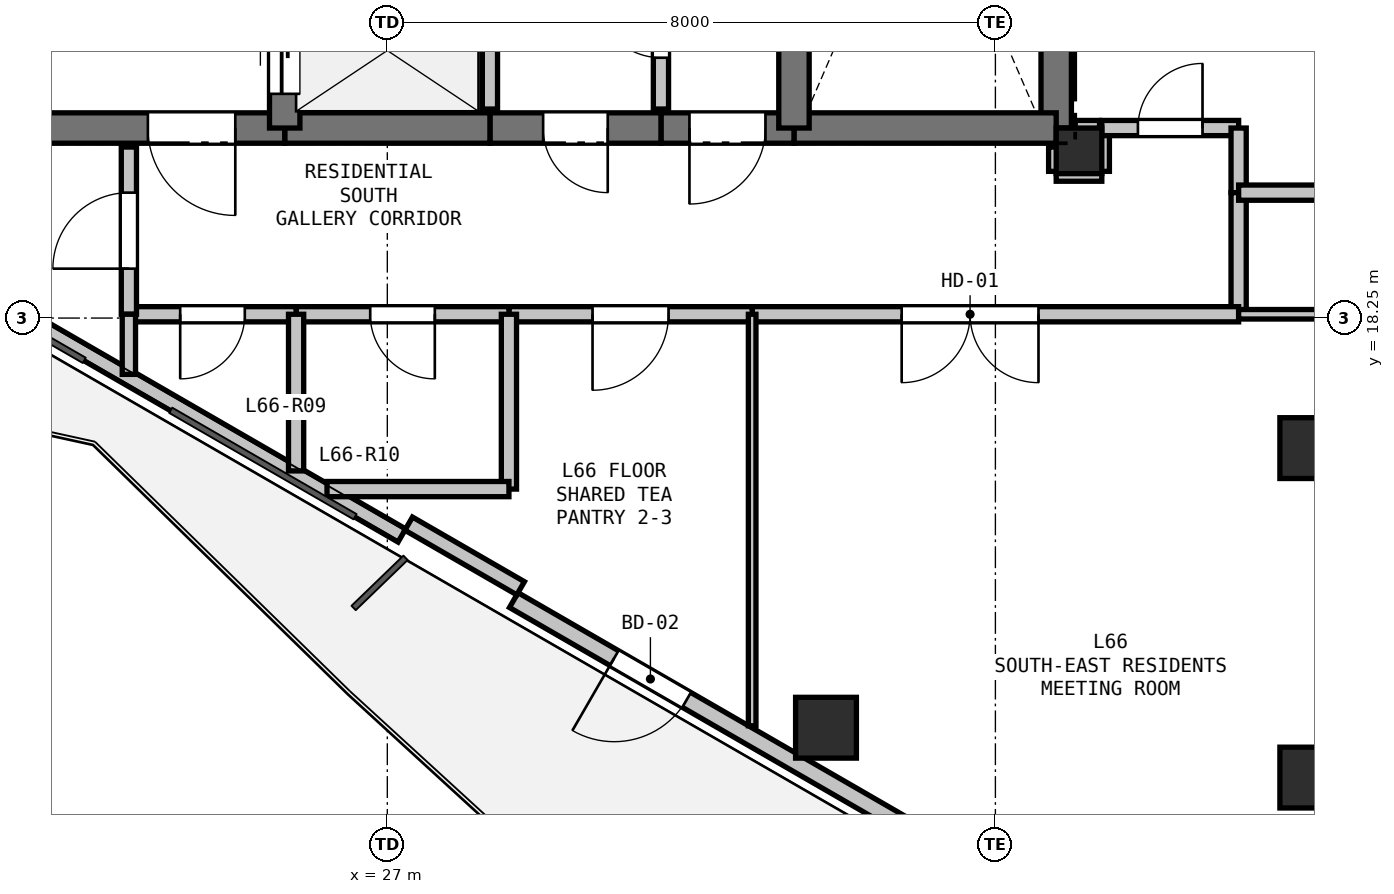
"""IFC4 building model, lengths in metres.
Left out: names, types, materials, properties, quantities, classifications, styles, units other than length and angle.
Written with IfcOpenShell. Run it as: python <this file> out.ifc"""

import sys

from ifc_helpers import new_model, si_unit, direction, frame, frame_2d, origin, origin_2d, place, context, subcontext, project, spatial, rectangle, hollow_rectangle, extrude, element, fill, save


model = new_model("IFC4")
c1 = context("Model", 3, precision=1e-05, world=origin(), true_north=direction((0.0, 1.0)))
c2 = subcontext(c1, "Body", "Model", "MODEL_VIEW")
j1 = project(units=[si_unit("LENGTHUNIT", "METRE"), si_unit("PLANEANGLEUNIT", "RADIAN")], contexts=[c1])
p1 = place(None, origin())
s1 = spatial("IfcSite", under=j1, at=p1, CompositionType="ELEMENT")
p2 = place(p1, origin())
s2 = spatial("IfcBuilding", under=s1, at=p2, CompositionType="ELEMENT")
p3 = place(p2, frame((0.0, 0.0, 236.4)))
s3 = spatial("IfcBuildingStorey", under=s2, at=p3, CompositionType="ELEMENT", Elevation=236.4)
p4 = place(p3, frame((36.1, 20.45, 0.0), z_axis=(0.0, 0.0, 1.0), x_axis=(1.0, 0.0, 0.0)))
e1 = element("IfcColumn", 1, at=p4, inside=s3, PredefinedType="COLUMN", context=c2, shape_type="SweptSolid", body=[
    extrude(rectangle(XDim=0.6, YDim=0.6, at=origin_2d()), origin(), (0.0, 0.0, 1.0), 3.3),
])
for number, where, z_axis, x_axis in (
    (2, (39.143, 16.539, 0.0), (0.0, 0.0, 1.0), (1.0, 0.0, 0.0)),
    (3, (39.143, 12.205, 0.0), (0.0, 0.0, 1.0), (1.0, 0.0, 0.0)),
    (4, (32.771, 12.861, 0.0), (0.0, 0.0, 1.0), (1.0, 0.0, 0.0)),
):
    element("IfcColumn", number, at=place(p3, frame(where, z_axis=z_axis, x_axis=x_axis)), inside=s3, PredefinedType="COLUMN", context=c2, shape_type="SweptSolid", body=[
        extrude(hollow_rectangle(XDim=0.8, YDim=0.8, WallThickness=0.025, at=origin_2d()), origin(), (0.0, 0.0, 1.0), 3.3),
    ])
p5 = place(p3, frame((39.743, 11.858, 0.0), z_axis=(0.0, 0.0, 1.0), x_axis=(-0.866038962515, -0.499976514854, 0.0)))
e5 = element("IfcWall", 5, at=p5, inside=s3, PredefinedType="SOLIDWALL", context=c2, shape_type="SweptSolid", body=[
    extrude(rectangle(XDim=3.716, YDim=0.225, at=frame_2d((1.858, 0.0))), origin(), (0.0, 0.0, 1.0), 2.7),
])
p6 = place(p3, frame((36.395, 10.076, 0.0), z_axis=(0.0, 0.0, 1.0), x_axis=(-0.866026655105, 0.499997832642, 0.0)))
e6 = element("IfcWall", 6, at=p6, inside=s3, PredefinedType="SOLIDWALL", context=c2, shape_type="SweptSolid", body=[
    extrude(rectangle(XDim=8.928, YDim=0.225, at=frame_2d((4.464, 0.0))), origin(), (0.0, 0.0, 1.0), 2.7),
])
p7 = place(p6, frame((6.302, 0.0, 0.0)))
e7 = element("IfcOpeningElement", 7, at=p7, cuts=e6, PredefinedType="OPENING", context=c2, shape_type="SweptSolid", body=[
    extrude(rectangle(XDim=1.1, YDim=2.1, at=frame_2d((0.55, 1.05))), frame((0.0, 0.123, 0.0), z_axis=(0.0, -1.0, 0.0), x_axis=(1.0, 0.0, 0.0)), (0.0, 0.0, 1.0), 0.245),
])
p8 = place(p3, frame((27.191, 15.389, 0.0), z_axis=(0.0, 0.0, 1.0), x_axis=(-0.866019557082, 0.500010126649, 0.0)))
e8 = element("IfcWall", 8, at=p8, inside=s3, PredefinedType="PARAPET", context=c2, shape_type="SweptSolid", body=[
    extrude(rectangle(XDim=8.228, YDim=0.2, at=frame_2d((4.114, 0.0))), origin(), (0.0, 0.0, 1.0), 0.2),
])
p9 = place(p3, frame((28.754, 14.695, 0.0), z_axis=(0.0, 0.0, 1.0), x_axis=(-0.866025371046, 0.500000056704, 0.0)))
e9 = element("IfcWall", 9, at=p9, inside=s3, PredefinedType="PARAPET", context=c2, shape_type="SweptSolid", body=[
    extrude(rectangle(XDim=1.7, YDim=0.2, at=frame_2d((0.85, 0.0))), origin(), (0.0, 0.0, 1.0), 2.7),
])
p10 = place(p3, frame((35.8, 28.1, 0.0), z_axis=(0.0, 0.0, 1.0), x_axis=(0.0, -1.0, 0.0)))
e10 = element("IfcWall", 10, at=p10, inside=s3, PredefinedType="SHEAR", context=c2, shape_type="SweptSolid", body=[
    extrude(rectangle(XDim=7.35, YDim=0.4, at=frame_2d((3.675, 0.0))), origin(), (0.0, 0.0, 1.0), 3.08),
])
p11 = place(p3, frame((35.8, 20.75, 0.0), z_axis=(0.0, 0.0, 1.0), x_axis=(-1.0, 0.0, 0.0)))
e11 = element("IfcWall", 11, at=p11, inside=s3, PredefinedType="SHEAR", context=c2, shape_type="SweptSolid", body=[
    extrude(rectangle(XDim=3.45, YDim=0.4, at=frame_2d((1.725, 0.0))), origin(), (0.0, 0.0, 1.0), 3.08),
])
p12 = place(p3, frame((32.35, 20.75, 0.0), z_axis=(0.0, 0.0, 1.0), x_axis=(-1.0, 0.0, 0.0)))
e12 = element("IfcWall", 12, at=p12, inside=s3, PredefinedType="SHEAR", context=c2, shape_type="SweptSolid", body=[
    extrude(rectangle(XDim=1.75, YDim=0.4, at=frame_2d((0.875, 0.0))), origin(), (0.0, 0.0, 1.0), 3.08),
])
p13 = place(p12, frame((0.375, 0.0, 0.0)))
e13 = element("IfcOpeningElement", 13, at=p13, cuts=e12, PredefinedType="OPENING", context=c2, shape_type="SweptSolid", body=[
    extrude(rectangle(XDim=1.0, YDim=2.15, at=frame_2d((0.5, 1.075))), frame((0.0, 0.21, 0.0), z_axis=(0.0, -1.0, 0.0), x_axis=(1.0, 0.0, 0.0)), (0.0, 0.0, 1.0), 0.42),
])
p14 = place(p3, frame((30.6, 20.75, 0.0), z_axis=(0.0, 0.0, 1.0), x_axis=(-1.0, 0.0, 0.0)))
e14 = element("IfcWall", 14, at=p14, inside=s3, PredefinedType="SHEAR", context=c2, shape_type="SweptSolid", body=[
    extrude(rectangle(XDim=2.25, YDim=0.4, at=frame_2d((1.125, 0.0))), origin(), (0.0, 0.0, 1.0), 3.08),
])
p15 = place(p14, frame((0.7, 0.0, 0.0)))
e15 = element("IfcOpeningElement", 15, at=p15, cuts=e14, PredefinedType="OPENING", context=c2, shape_type="SweptSolid", body=[
    extrude(rectangle(XDim=0.85, YDim=2.1, at=frame_2d((0.425, 1.05))), frame((0.0, 0.21, 0.0), z_axis=(0.0, -1.0, 0.0), x_axis=(1.0, 0.0, 0.0)), (0.0, 0.0, 1.0), 0.42),
])
p16 = place(p3, frame((28.35, 20.75, 0.0), z_axis=(0.0, 0.0, 1.0), x_axis=(-1.0, 0.0, 0.0)))
e16 = element("IfcWall", 16, at=p16, inside=s3, PredefinedType="SHEAR", context=c2, shape_type="SweptSolid", body=[
    extrude(rectangle(XDim=2.7, YDim=0.4, at=frame_2d((1.35, 0.0))), origin(), (0.0, 0.0, 1.0), 3.08),
])
p17 = place(p3, frame((25.65, 20.75, 0.0), z_axis=(0.0, 0.0, 1.0), x_axis=(-1.0, 0.0, 0.0)))
e17 = element("IfcWall", 17, at=p17, inside=s3, PredefinedType="SHEAR", context=c2, shape_type="SweptSolid", body=[
    extrude(rectangle(XDim=3.45, YDim=0.4, at=frame_2d((1.725, 0.0))), origin(), (0.0, 0.0, 1.0), 3.08),
])
p18 = place(p17, frame((0.65, 0.0, 0.0)))
e18 = element("IfcOpeningElement", 18, at=p18, cuts=e17, PredefinedType="OPENING", context=c2, shape_type="SweptSolid", body=[
    extrude(rectangle(XDim=1.15, YDim=2.15, at=frame_2d((0.575, 1.075))), frame((0.0, 0.21, 0.0), z_axis=(0.0, -1.0, 0.0), x_axis=(1.0, 0.0, 0.0)), (0.0, 0.0, 1.0), 0.42),
])
p19 = place(p3, frame((25.65, 20.75, 0.0), z_axis=(0.0, 0.0, 1.0), x_axis=(0.0, 1.0, 0.0)))
e19 = element("IfcWall", 19, at=p19, inside=s3, PredefinedType="SHEAR", context=c2, shape_type="SweptSolid", body=[
    extrude(rectangle(XDim=2.0, YDim=0.4, at=frame_2d((1.0, 0.0))), origin(), (0.0, 0.0, 1.0), 3.08),
])
p20 = place(p19, frame((0.45, 0.0, 0.0)))
e20 = element("IfcOpeningElement", 20, at=p20, cuts=e19, PredefinedType="OPENING", context=c2, shape_type="SweptSolid", body=[
    extrude(rectangle(XDim=1.1, YDim=2.15, at=frame_2d((0.55, 1.075))), frame((0.0, 0.21, 0.0), z_axis=(0.0, -1.0, 0.0), x_axis=(1.0, 0.0, 0.0)), (0.0, 0.0, 1.0), 0.42),
])
p21 = place(p3, frame((32.35, 20.75, 0.0), z_axis=(0.0, 0.0, 1.0), x_axis=(0.0, 1.0, 0.0)))
e21 = element("IfcWall", 21, at=p21, inside=s3, PredefinedType="SHEAR", context=c2, shape_type="SweptSolid", body=[
    extrude(rectangle(XDim=4.8, YDim=0.4, at=frame_2d((2.4, 0.0))), origin(), (0.0, 0.0, 1.0), 3.08),
])
p22 = place(p3, frame((28.35, 23.2, 0.0), z_axis=(0.0, 0.0, 1.0), x_axis=(0.0, -1.0, 0.0)))
e22 = element("IfcWall", 22, at=p22, inside=s3, PredefinedType="PARTITIONING", context=c2, shape_type="SweptSolid", body=[
    extrude(rectangle(XDim=2.2, YDim=0.2, at=frame_2d((1.1, 0.0))), origin(), (0.0, 0.0, 1.0), 3.08),
])
p23 = place(p3, frame((30.6, 21.0, 0.0), z_axis=(0.0, 0.0, 1.0), x_axis=(0.0, 1.0, 0.0)))
e23 = element("IfcWall", 23, at=p23, inside=s3, PredefinedType="PARTITIONING", context=c2, shape_type="SweptSolid", body=[
    extrude(rectangle(XDim=2.2, YDim=0.2, at=frame_2d((1.1, 0.0))), origin(), (0.0, 0.0, 1.0), 3.08),
])
p24 = place(p23, frame((0.675, 0.0, 0.0)))
e24 = element("IfcOpeningElement", 24, at=p24, cuts=e23, PredefinedType="OPENING", context=c2, shape_type="SweptSolid", body=[
    extrude(rectangle(XDim=0.85, YDim=2.1, at=frame_2d((0.425, 1.05))), frame((0.0, 0.11, 0.0), z_axis=(0.0, -1.0, 0.0), x_axis=(1.0, 0.0, 0.0)), (0.0, 0.0, 1.0), 0.22),
])
p25 = place(p3, frame((35.8, 20.15, 0.0), z_axis=(0.0, 0.0, 1.0), x_axis=(1.0, 0.0, 0.0)))
e25 = element("IfcWall", 25, at=p25, inside=s3, PredefinedType="PARTITIONING", context=c2, shape_type="SweptSolid", body=[
    extrude(rectangle(XDim=0.6, YDim=0.2, at=frame_2d((0.3, 0.0))), origin(), (0.0, 0.0, 1.0), 2.528),
])
p26 = place(p3, frame((36.4, 20.18, 0.0), z_axis=(0.0, 0.0, 1.0), x_axis=(0.0, 1.0, 0.0)))
e26 = element("IfcWall", 26, at=p26, inside=s3, PredefinedType="PARTITIONING", context=c2, shape_type="SweptSolid", body=[
    extrude(rectangle(XDim=0.57, YDim=0.2, at=frame_2d((0.285, 0.0))), origin(), (0.0, 0.0, 1.0), 3.08),
])
p27 = place(p3, frame((36.4, 20.75, 0.0), z_axis=(0.0, 0.0, 1.0), x_axis=(1.0, 0.0, 0.0)))
e27 = element("IfcWall", 27, at=p27, inside=s3, PredefinedType="PARTITIONING", context=c2, shape_type="SweptSolid", body=[
    extrude(rectangle(XDim=1.8, YDim=0.2, at=frame_2d((0.9, 0.0))), origin(), (0.0, 0.0, 1.0), 3.08),
])
p28 = place(p27, frame((0.475, 0.0, 0.0)))
e28 = element("IfcOpeningElement", 28, at=p28, cuts=e27, PredefinedType="OPENING", context=c2, shape_type="SweptSolid", body=[
    extrude(rectangle(XDim=0.85, YDim=2.1, at=frame_2d((0.425, 1.05))), frame((0.0, 0.11, 0.0), z_axis=(0.0, -1.0, 0.0), x_axis=(1.0, 0.0, 0.0)), (0.0, 0.0, 1.0), 0.22),
])
p29 = place(p3, frame((38.2, 20.75, 0.0), z_axis=(0.0, 0.0, 1.0), x_axis=(0.0, -1.0, 0.0)))
e29 = element("IfcWall", 29, at=p29, inside=s3, PredefinedType="PARTITIONING", context=c2, shape_type="SweptSolid", body=[
    extrude(rectangle(XDim=0.85, YDim=0.2, at=frame_2d((0.425, 0.0))), origin(), (0.0, 0.0, 1.0), 3.08),
])
p30 = place(p3, frame((38.2, 19.9, 0.0), z_axis=(0.0, 0.0, 1.0), x_axis=(0.0, -1.0, 0.0)))
e30 = element("IfcWall", 30, at=p30, inside=s3, PredefinedType="PARTITIONING", context=c2, shape_type="SweptSolid", body=[
    extrude(rectangle(XDim=1.6, YDim=0.2, at=frame_2d((0.8, 0.0))), origin(), (0.0, 0.0, 1.0), 3.08),
])
p31 = place(p3, frame((38.2, 18.3, 0.0), z_axis=(0.0, 0.0, 1.0), x_axis=(-1.0, 0.0, 0.0)))
e31 = element("IfcWall", 31, at=p31, inside=s3, PredefinedType="PARTITIONING", context=c2, shape_type="SweptSolid", body=[
    extrude(rectangle(XDim=6.4, YDim=0.2, at=frame_2d((3.2, 0.0))), origin(), (0.0, 0.0, 1.0), 2.528),
])
p32 = place(p31, frame((2.633, 0.0, 0.0)))
e32 = element("IfcOpeningElement", 32, at=p32, cuts=e31, PredefinedType="OPENING", context=c2, shape_type="SweptSolid", body=[
    extrude(rectangle(XDim=1.8, YDim=2.2, at=frame_2d((0.9, 1.1))), frame((0.0, 0.11, 0.0), z_axis=(0.0, -1.0, 0.0), x_axis=(1.0, 0.0, 0.0)), (0.0, 0.0, 1.0), 0.22),
])
p33 = place(p3, frame((31.8, 18.3, 0.0), z_axis=(0.0, 0.0, 1.0), x_axis=(-1.0, 0.0, 0.0)))
e33 = element("IfcWall", 33, at=p33, inside=s3, PredefinedType="PARTITIONING", context=c2, shape_type="SweptSolid", body=[
    extrude(rectangle(XDim=3.2, YDim=0.2, at=frame_2d((1.6, 0.0))), origin(), (0.0, 0.0, 1.0), 3.08),
])
p34 = place(p33, frame((1.1, 0.0, 0.0)))
e34 = element("IfcOpeningElement", 34, at=p34, cuts=e33, PredefinedType="OPENING", context=c2, shape_type="SweptSolid", body=[
    extrude(rectangle(XDim=1.0, YDim=2.15, at=frame_2d((0.5, 1.075))), frame((0.0, 0.11, 0.0), z_axis=(0.0, -1.0, 0.0), x_axis=(1.0, 0.0, 0.0)), (0.0, 0.0, 1.0), 0.22),
])
p35 = place(p3, frame((28.6, 18.3, 0.0), z_axis=(0.0, 0.0, 1.0), x_axis=(-1.0, 0.0, 0.0)))
e35 = element("IfcWall", 35, at=p35, inside=s3, PredefinedType="PARTITIONING", context=c2, shape_type="SweptSolid", body=[
    extrude(rectangle(XDim=2.8, YDim=0.2, at=frame_2d((1.4, 0.0))), origin(), (0.0, 0.0, 1.0), 3.08),
])
p36 = place(p35, frame((0.975, 0.0, 0.0)))
e36 = element("IfcOpeningElement", 36, at=p36, cuts=e35, PredefinedType="OPENING", context=c2, shape_type="SweptSolid", body=[
    extrude(rectangle(XDim=0.85, YDim=2.1, at=frame_2d((0.425, 1.05))), frame((0.0, 0.11, 0.0), z_axis=(0.0, -1.0, 0.0), x_axis=(1.0, 0.0, 0.0)), (0.0, 0.0, 1.0), 0.22),
])
p37 = place(p3, frame((25.8, 18.3, 0.0), z_axis=(0.0, 0.0, 1.0), x_axis=(-1.0, 0.0, 0.0)))
e37 = element("IfcWall", 37, at=p37, inside=s3, PredefinedType="PARTITIONING", context=c2, shape_type="SweptSolid", body=[
    extrude(rectangle(XDim=2.2, YDim=0.2, at=frame_2d((1.1, 0.0))), origin(), (0.0, 0.0, 1.0), 2.365),
])
p38 = place(p37, frame((0.675, 0.0, 0.0)))
e38 = element("IfcOpeningElement", 38, at=p38, cuts=e37, PredefinedType="OPENING", context=c2, shape_type="SweptSolid", body=[
    extrude(rectangle(XDim=0.85, YDim=2.1, at=frame_2d((0.425, 1.05))), frame((0.0, 0.11, 0.0), z_axis=(0.0, -1.0, 0.0), x_axis=(1.0, 0.0, 0.0)), (0.0, 0.0, 1.0), 0.22),
])
p39 = place(p3, frame((23.6, 18.3, 0.0), z_axis=(0.0, 0.0, 1.0), x_axis=(0.0, 1.0, 0.0)))
e39 = element("IfcWall", 39, at=p39, inside=s3, PredefinedType="PARTITIONING", context=c2, shape_type="SweptSolid", body=[
    extrude(rectangle(XDim=2.2, YDim=0.2, at=frame_2d((1.1, 0.0))), origin(), (0.0, 0.0, 1.0), 2.528),
])
p40 = place(p39, frame((0.6, 0.0, 0.0)))
e40 = element("IfcOpeningElement", 40, at=p40, cuts=e39, PredefinedType="OPENING", context=c2, shape_type="SweptSolid", body=[
    extrude(rectangle(XDim=1.0, YDim=2.15, at=frame_2d((0.5, 1.075))), frame((0.0, 0.11, 0.0), z_axis=(0.0, -1.0, 0.0), x_axis=(1.0, 0.0, 0.0)), (0.0, 0.0, 1.0), 0.22),
])
p41 = place(p3, frame((35.8, 20.5, 0.0), z_axis=(0.0, 0.0, 1.0), x_axis=(0.0, -1.0, 0.0)))
e41 = element("IfcWall", 41, at=p41, inside=s3, PredefinedType="PARTITIONING", context=c2, shape_type="SweptSolid", body=[
    extrude(rectangle(XDim=0.32, YDim=0.2, at=frame_2d((0.16, 0.0))), origin(), (0.0, 0.0, 1.0), 2.605),
])
p42 = place(p3, frame((25.8, 18.3, 0.0), z_axis=(0.0, 0.0, 1.0), x_axis=(0.0, -1.0, 0.0)))
e42 = element("IfcWall", 42, at=p42, inside=s3, PredefinedType="PARTITIONING", context=c2, shape_type="SweptSolid", body=[
    extrude(rectangle(XDim=2.061, YDim=0.2, at=frame_2d((1.031, 0.0))), origin(), (0.0, 0.0, 1.0), 2.365),
])
p43 = place(p3, frame((23.6, 17.509, 0.0), z_axis=(0.0, 0.0, 1.0), x_axis=(0.0, 1.0, 0.0)))
e43 = element("IfcWall", 43, at=p43, inside=s3, PredefinedType="PLUMBINGWALL", context=c2, shape_type="SweptSolid", body=[
    extrude(rectangle(XDim=0.791, YDim=0.175, at=frame_2d((0.396, 0.0))), origin(), (0.0, 0.0, 1.0), 2.365),
])
p44 = place(p3, frame((31.8, 12.886, 0.0), z_axis=(0.0, 0.0, 1.0), x_axis=(0.0, 1.0, 0.0)))
e44 = element("IfcWall", 44, at=p44, inside=s3, PredefinedType="PARTITIONING", context=c2, shape_type="SweptSolid", body=[
    extrude(rectangle(XDim=5.414, YDim=0.1, at=frame_2d((2.707, 0.0))), origin(), (0.0, 0.0, 1.0), 2.365),
])
p45 = place(p3, frame((38.2, 18.3, 0.0), z_axis=(0.0, 0.0, 1.0), x_axis=(1.0, 0.0, 0.0)))
e45 = element("IfcWall", 45, at=p45, inside=s3, PredefinedType="PARTITIONING", context=c2, shape_type="SweptSolid", body=[
    extrude(rectangle(XDim=1.406, YDim=0.125, at=frame_2d((0.703, 0.0))), origin(), (0.0, 0.0, 1.0), 2.365),
])
p46 = place(p3, frame((36.37, 20.75, 0.0), z_axis=(0.0, 0.0, 1.0), x_axis=(-1.0, 0.0, 0.0)))
e46 = element("IfcWall", 46, at=p46, inside=s3, PredefinedType="PARTITIONING", context=c2, shape_type="SweptSolid", body=[
    extrude(rectangle(XDim=0.32, YDim=0.2, at=frame_2d((0.16, 0.0))), origin(), (0.0, 0.0, 1.0), 2.605),
])
p47 = place(p3, frame((39.606, 19.9, 0.0), z_axis=(0.0, 0.0, 1.0), x_axis=(-1.0, 0.0, 0.0)))
e47 = element("IfcWall", 47, at=p47, inside=s3, PredefinedType="PARTITIONING", context=c2, shape_type="SweptSolid", body=[
    extrude(rectangle(XDim=1.406, YDim=0.2, at=frame_2d((0.703, 0.0))), origin(), (0.0, 0.0, 1.0), 2.365),
])
p48 = place(p3, frame((28.6, 18.3, 0.0), z_axis=(0.0, 0.0, 1.0), x_axis=(0.0, -1.0, 0.0)))
e48 = element("IfcWall", 48, at=p48, inside=s3, PredefinedType="PARTITIONING", context=c2, shape_type="SweptSolid", body=[
    extrude(rectangle(XDim=2.3, YDim=0.2, at=frame_2d((1.15, 0.0))), origin(), (0.0, 0.0, 1.0), 3.08),
])
p49 = place(p3, frame((28.6, 16.0, 0.0), z_axis=(0.0, 0.0, 1.0), x_axis=(-1.0, 0.0, 0.0)))
e49 = element("IfcWall", 49, at=p49, inside=s3, PredefinedType="PARTITIONING", context=c2, shape_type="SweptSolid", body=[
    extrude(rectangle(XDim=2.394, YDim=0.2, at=frame_2d((1.197, 0.0))), origin(), (0.0, 0.0, 1.0), 2.365),
])
p50 = place(p7, origin())
e50 = element("IfcDoor", 50, at=p50, inside=s3, OperationType="SINGLE_SWING_RIGHT", PredefinedType="DOOR", context=c2, shape_type="SweptSolid", body=[
    extrude(rectangle(XDim=1.1, YDim=2.1, at=frame_2d((0.55, 1.05))), frame((0.0, 0.025, 0.0), z_axis=(0.0, -1.0, 0.0), x_axis=(1.0, 0.0, 0.0)), (0.0, 0.0, 1.0), 0.05),
])
fill(e7, e50)
p51 = place(p13, origin())
e51 = element("IfcDoor", 51, at=p51, inside=s3, OperationType="SINGLE_SWING_RIGHT", PredefinedType="DOOR", context=c2, shape_type="SweptSolid", body=[
    extrude(rectangle(XDim=1.0, YDim=2.15, at=frame_2d((0.5, 1.075))), frame((0.0, 0.025, 0.0), z_axis=(0.0, -1.0, 0.0), x_axis=(1.0, 0.0, 0.0)), (0.0, 0.0, 1.0), 0.05),
])
fill(e13, e51)
p52 = place(p20, origin())
e52 = element("IfcDoor", 52, at=p52, inside=s3, OperationType="SLIDING_TO_LEFT", PredefinedType="DOOR", context=c2, shape_type="SweptSolid", body=[
    extrude(rectangle(XDim=1.1, YDim=2.15, at=frame_2d((0.55, 1.075))), frame((0.0, 0.025, 0.0), z_axis=(0.0, -1.0, 0.0), x_axis=(1.0, 0.0, 0.0)), (0.0, 0.0, 1.0), 0.05),
])
fill(e20, e52)
p53 = place(p18, origin())
e53 = element("IfcDoor", 53, at=p53, inside=s3, OperationType="SINGLE_SWING_LEFT", PredefinedType="DOOR", context=c2, shape_type="SweptSolid", body=[
    extrude(rectangle(XDim=1.15, YDim=2.15, at=frame_2d((0.575, 1.075))), frame((0.0, 0.025, 0.0), z_axis=(0.0, -1.0, 0.0), x_axis=(1.0, 0.0, 0.0)), (0.0, 0.0, 1.0), 0.05),
])
fill(e18, e53)
p54 = place(p24, origin())
e54 = element("IfcDoor", 54, at=p54, inside=s3, OperationType="SINGLE_SWING_RIGHT", PredefinedType="DOOR", context=c2, shape_type="SweptSolid", body=[
    extrude(rectangle(XDim=0.85, YDim=2.1, at=frame_2d((0.425, 1.05))), frame((0.0, 0.025, 0.0), z_axis=(0.0, -1.0, 0.0), x_axis=(1.0, 0.0, 0.0)), (0.0, 0.0, 1.0), 0.05),
])
fill(e24, e54)
p55 = place(p38, origin())
e55 = element("IfcDoor", 55, at=p55, inside=s3, OperationType="SINGLE_SWING_RIGHT", PredefinedType="DOOR", context=c2, shape_type="SweptSolid", body=[
    extrude(rectangle(XDim=0.85, YDim=2.1, at=frame_2d((0.425, 1.05))), frame((0.0, 0.025, 0.0), z_axis=(0.0, -1.0, 0.0), x_axis=(1.0, 0.0, 0.0)), (0.0, 0.0, 1.0), 0.05),
])
fill(e38, e55)
p56 = place(p15, origin())
e56 = element("IfcDoor", 56, at=p56, inside=s3, OperationType="SINGLE_SWING_LEFT", PredefinedType="DOOR", context=c2, shape_type="SweptSolid", body=[
    extrude(rectangle(XDim=0.85, YDim=2.1, at=frame_2d((0.425, 1.05))), frame((0.0, 0.025, 0.0), z_axis=(0.0, -1.0, 0.0), x_axis=(1.0, 0.0, 0.0)), (0.0, 0.0, 1.0), 0.05),
])
fill(e15, e56)
p57 = place(p32, origin())
e57 = element("IfcDoor", 57, at=p57, inside=s3, OperationType="DOUBLE_DOOR_SINGLE_SWING", PredefinedType="DOOR", context=c2, shape_type="SweptSolid", body=[
    extrude(rectangle(XDim=1.8, YDim=2.2, at=frame_2d((0.9, 1.1))), frame((0.0, 0.025, 0.0), z_axis=(0.0, -1.0, 0.0), x_axis=(1.0, 0.0, 0.0)), (0.0, 0.0, 1.0), 0.05),
])
fill(e32, e57)
p58 = place(p40, origin())
e58 = element("IfcDoor", 58, at=p58, inside=s3, OperationType="SINGLE_SWING_LEFT", PredefinedType="DOOR", context=c2, shape_type="SweptSolid", body=[
    extrude(rectangle(XDim=1.0, YDim=2.15, at=frame_2d((0.5, 1.075))), frame((0.0, 0.025, 0.0), z_axis=(0.0, -1.0, 0.0), x_axis=(1.0, 0.0, 0.0)), (0.0, 0.0, 1.0), 0.05),
])
fill(e40, e58)
p59 = place(p28, origin())
e59 = element("IfcDoor", 59, at=p59, inside=s3, OperationType="SINGLE_SWING_RIGHT", PredefinedType="DOOR", context=c2, shape_type="SweptSolid", body=[
    extrude(rectangle(XDim=0.85, YDim=2.1, at=frame_2d((0.425, 1.05))), frame((0.0, 0.025, 0.0), z_axis=(0.0, -1.0, 0.0), x_axis=(1.0, 0.0, 0.0)), (0.0, 0.0, 1.0), 0.05),
])
fill(e28, e59)
p60 = place(p36, origin())
e60 = element("IfcDoor", 60, at=p60, inside=s3, OperationType="SINGLE_SWING_LEFT", PredefinedType="DOOR", context=c2, shape_type="SweptSolid", body=[
    extrude(rectangle(XDim=0.85, YDim=2.1, at=frame_2d((0.425, 1.05))), frame((0.0, 0.025, 0.0), z_axis=(0.0, -1.0, 0.0), x_axis=(1.0, 0.0, 0.0)), (0.0, 0.0, 1.0), 0.05),
])
fill(e36, e60)
p61 = place(p34, origin())
e61 = element("IfcDoor", 61, at=p61, inside=s3, OperationType="SINGLE_SWING_RIGHT", PredefinedType="DOOR", context=c2, shape_type="SweptSolid", body=[
    extrude(rectangle(XDim=1.0, YDim=2.15, at=frame_2d((0.5, 1.075))), frame((0.0, 0.025, 0.0), z_axis=(0.0, -1.0, 0.0), x_axis=(1.0, 0.0, 0.0)), (0.0, 0.0, 1.0), 0.05),
])
fill(e34, e61)
save(model, sys.argv[1])
